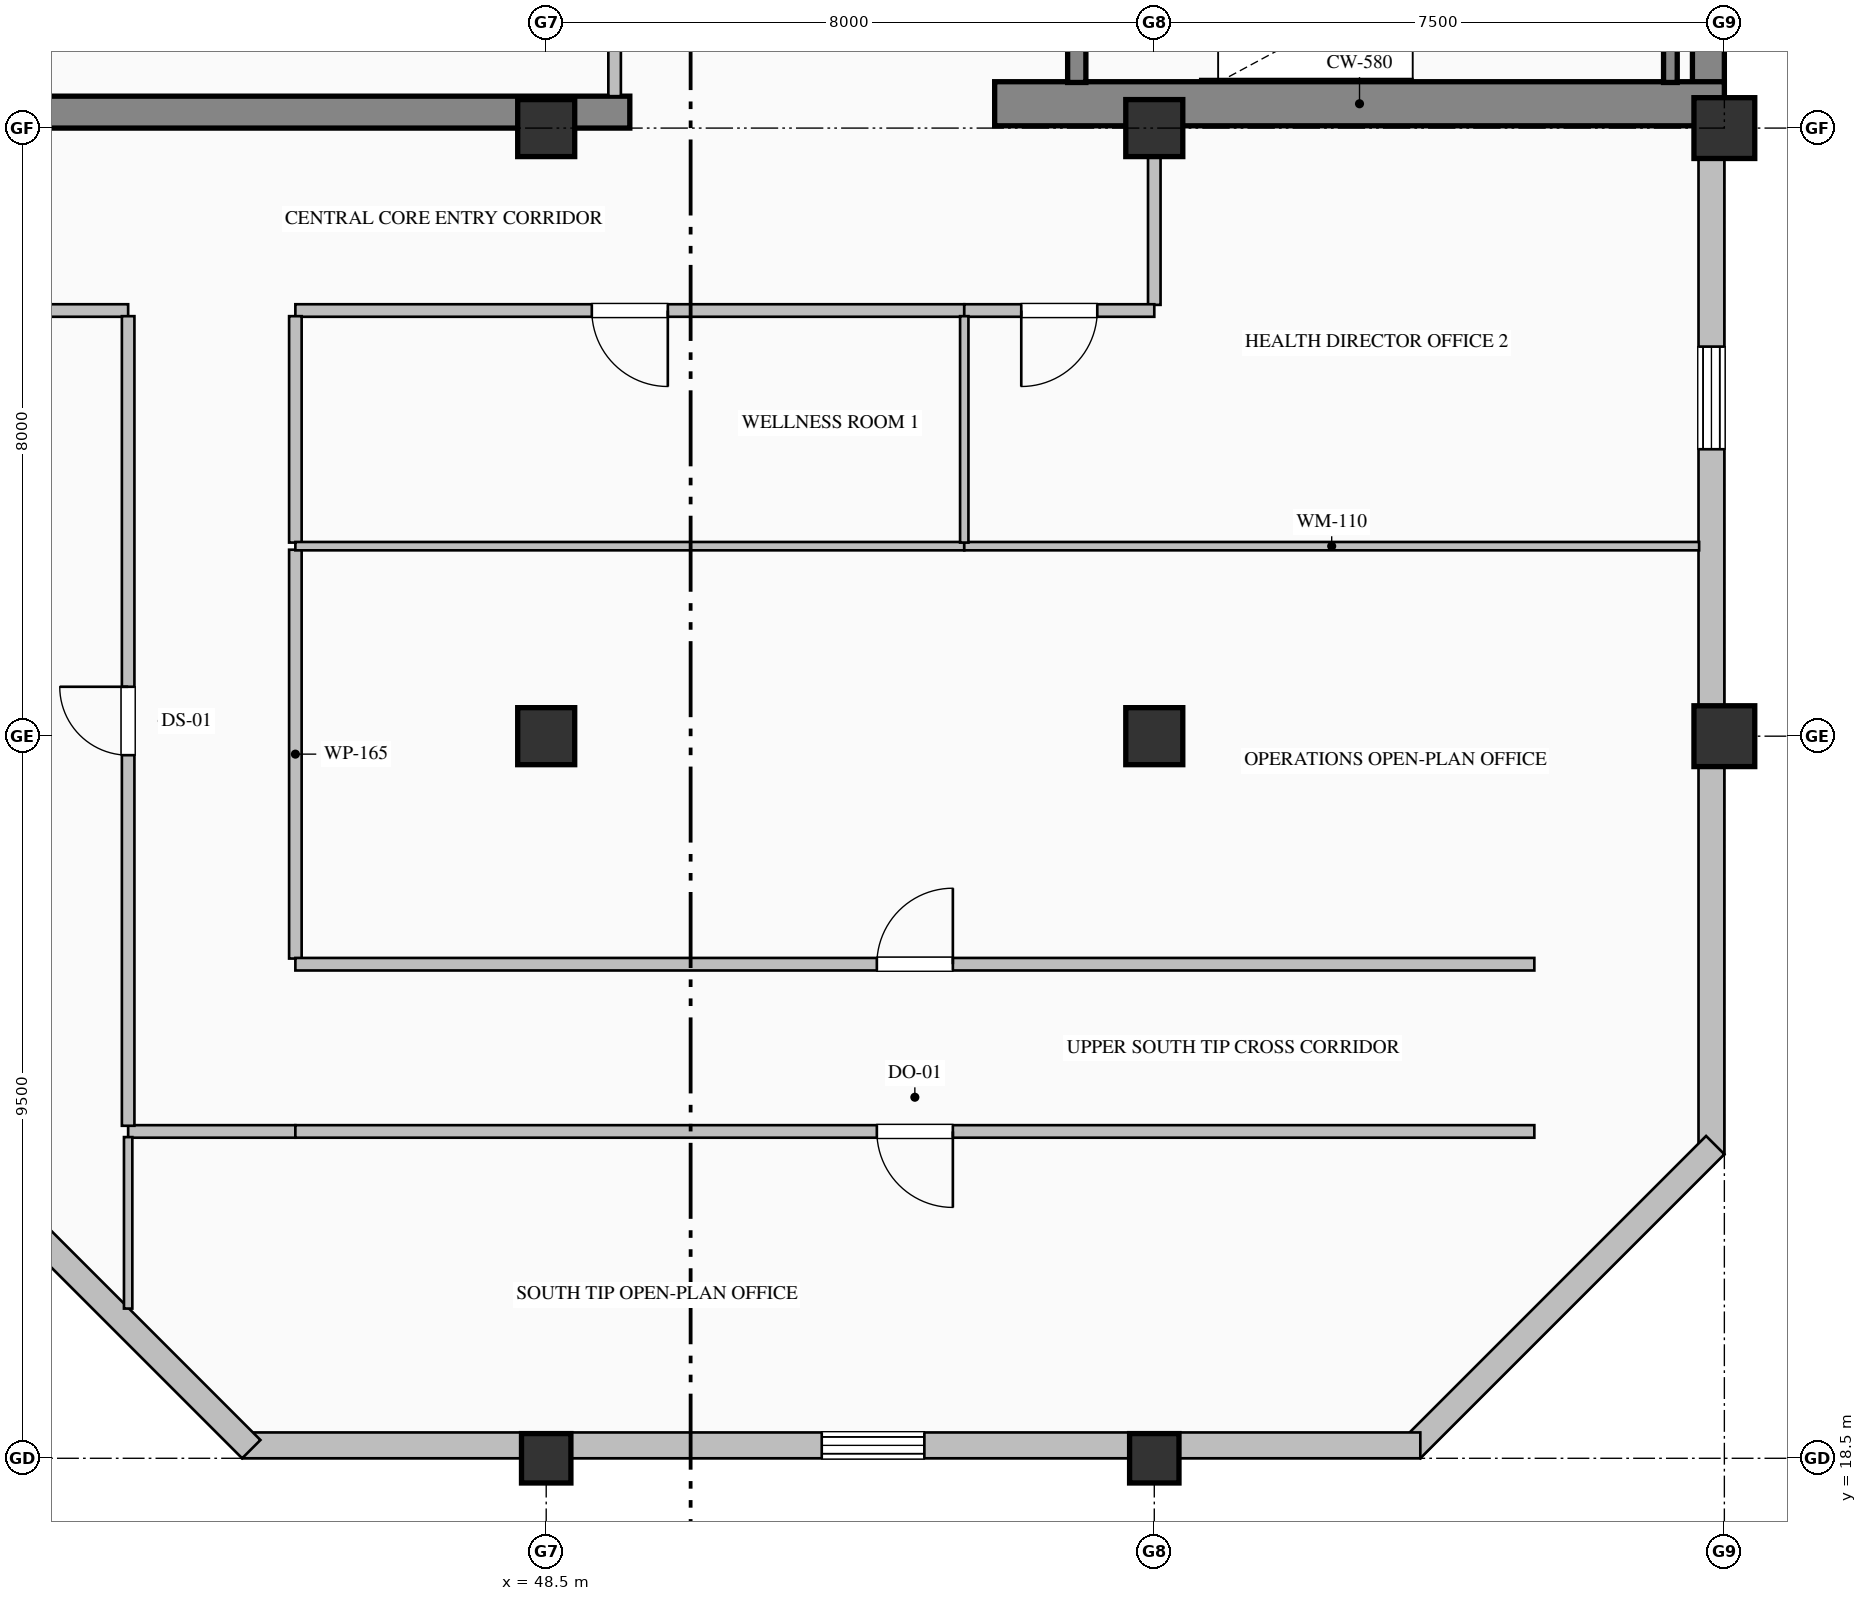
"""IFC4 building model, lengths in metres.
Left out: names, types, materials, properties, quantities, classifications, styles, units other than length and angle.
Written with IfcOpenShell. Run it as: python <this file> out.ifc"""

import sys

from ifc_helpers import new_model, si_unit, direction, frame, frame_2d, origin, origin_2d, place, context, subcontext, project, spatial, rectangle, hollow_rectangle, extrude, element, fill, save


model = new_model("IFC4")
c1 = context("Model", 3, precision=1e-05, world=origin(), true_north=direction((0.0, 1.0)))
c2 = subcontext(c1, "Body", "Model", "MODEL_VIEW")
j1 = project(units=[si_unit("LENGTHUNIT", "METRE"), si_unit("PLANEANGLEUNIT", "RADIAN")], contexts=[c1])
p1 = place(None, origin())
s1 = spatial("IfcSite", under=j1, at=p1, CompositionType="ELEMENT")
p2 = place(p1, origin())
s2 = spatial("IfcBuilding", under=s1, at=p2, CompositionType="ELEMENT")
p3 = place(p2, frame((0.0, 0.0, 343.2)))
s3 = spatial("IfcBuildingStorey", under=s2, at=p3, CompositionType="ELEMENT", Elevation=343.2)
p4 = place(p3, frame((63.79, 36.32, 0.0), z_axis=(0.0, 0.0, 1.0), x_axis=(0.0, 1.0, 0.0)))
e1 = element("IfcWall", 1, at=p4, inside=s3, PredefinedType="SHEAR", context=c2, shape_type="SweptSolid", body=[
    extrude(rectangle(XDim=15.26, YDim=0.42, at=frame_2d((7.63, 0.0))), origin(), (0.0, 0.0, 1.0), 3.785),
])
p5 = place(p3, frame((40.5, 36.21, 0.0), z_axis=(0.0, 0.0, 1.0), x_axis=(1.0, 0.0, 0.0)))
e2 = element("IfcWall", 2, at=p5, inside=s3, PredefinedType="SHEAR", context=c2, shape_type="SweptSolid", body=[
    extrude(rectangle(XDim=9.1, YDim=0.42, at=frame_2d((4.55, 0.0))), origin(), (0.0, 0.0, 1.0), 3.785),
])
p6 = place(p3, frame((54.4, 36.32, 0.0), z_axis=(0.0, 0.0, 1.0), x_axis=(1.0, 0.0, 0.0)))
e3 = element("IfcWall", 3, at=p6, inside=s3, PredefinedType="SHEAR", context=c2, shape_type="SweptSolid", body=[
    extrude(rectangle(XDim=9.6, YDim=0.58, at=frame_2d((4.8, 0.0))), origin(), (0.0, 0.0, 1.0), 4.0),
])
p7 = place(p3, frame((48.5, 18.5, 0.0), z_axis=(0.0, 0.0, 1.0), x_axis=(1.0, 0.0, 0.0)))
e4 = element("IfcColumn", 4, at=p7, inside=s3, PredefinedType="COLUMN", context=c2, shape_type="SweptSolid", body=[
    extrude(hollow_rectangle(XDim=0.65, YDim=0.65, WallThickness=0.028, at=origin_2d()), origin(), (0.0, 0.0, 1.0), 4.0),
])
for number, where, z_axis, x_axis in (
    (5, (48.5, 28.0, 0.0), (0.0, 0.0, 1.0), (1.0, 0.0, 0.0)),
    (6, (48.5, 36.0, 0.0), (0.0, 0.0, 1.0), (1.0, 0.0, 0.0)),
):
    element("IfcColumn", number, at=place(p3, frame(where, z_axis=z_axis, x_axis=x_axis)), inside=s3, PredefinedType="COLUMN", context=c2, shape_type="SweptSolid", body=[
        extrude(rectangle(XDim=0.75, YDim=0.75, at=origin_2d()), origin(), (0.0, 0.0, 1.0), 4.0),
    ])
p8 = place(p3, frame((56.5, 18.5, 0.0), z_axis=(0.0, 0.0, 1.0), x_axis=(1.0, 0.0, 0.0)))
e7 = element("IfcColumn", 7, at=p8, inside=s3, PredefinedType="COLUMN", context=c2, shape_type="SweptSolid", body=[
    extrude(hollow_rectangle(XDim=0.65, YDim=0.65, WallThickness=0.028, at=origin_2d()), origin(), (0.0, 0.0, 1.0), 4.0),
])
for number, where, z_axis, x_axis in (
    (8, (56.5, 28.0, 0.0), (0.0, 0.0, 1.0), (1.0, 0.0, 0.0)),
    (9, (56.5, 36.0, 0.0), (0.0, 0.0, 1.0), (1.0, 0.0, 0.0)),
):
    element("IfcColumn", number, at=place(p3, frame(where, z_axis=z_axis, x_axis=x_axis)), inside=s3, PredefinedType="COLUMN", context=c2, shape_type="SweptSolid", body=[
        extrude(rectangle(XDim=0.75, YDim=0.75, at=origin_2d()), origin(), (0.0, 0.0, 1.0), 4.0),
    ])
for number, where, z_axis, x_axis in (
    (10, (64.0, 28.0, 0.0), (0.0, 0.0, 1.0), (1.0, 0.0, 0.0)),
    (11, (64.0, 36.0, 0.0), (0.0, 0.0, 1.0), (1.0, 0.0, 0.0)),
):
    element("IfcColumn", number, at=place(p3, frame(where, z_axis=z_axis, x_axis=x_axis)), inside=s3, PredefinedType="COLUMN", context=c2, shape_type="SweptSolid", body=[
        extrude(hollow_rectangle(XDim=0.8, YDim=0.8, WallThickness=0.032, at=origin_2d()), origin(), (0.0, 0.0, 1.0), 4.0),
    ])
p9 = place(p3, frame((63.83, 36.05, 0.0), z_axis=(0.0, 0.0, 1.0), x_axis=(0.0, -1.0, 0.0)))
e12 = element("IfcWall", 12, at=p9, inside=s3, PredefinedType="SOLIDWALL", context=c2, shape_type="SweptSolid", body=[
    extrude(rectangle(XDim=13.55, YDim=0.34, at=frame_2d((6.775, 0.0))), origin(), (0.0, 0.0, 1.0), 3.335),
])
p10 = place(p9, frame((2.925, 0.0, 0.9)))
e13 = element("IfcOpeningElement", 13, at=p10, cuts=e12, PredefinedType="OPENING", context=c2, shape_type="SweptSolid", body=[
    extrude(rectangle(XDim=1.35, YDim=1.85, at=frame_2d((0.675, 0.925))), frame((0.0, 0.18, 0.0), z_axis=(0.0, -1.0, 0.0), x_axis=(1.0, 0.0, 0.0)), (0.0, 0.0, 1.0), 0.36),
])
p11 = place(p3, frame((63.88, 22.62, 0.0), z_axis=(0.0, 0.0, 1.0), x_axis=(-0.707106781187, -0.707106781187, 0.0)))
e14 = element("IfcWall", 14, at=p11, inside=s3, PredefinedType="SOLIDWALL", context=c2, shape_type="SweptSolid", body=[
    extrude(rectangle(XDim=5.657, YDim=0.34, at=frame_2d((2.828, 0.0))), origin(), (0.0, 0.0, 1.0), 3.785),
])
p12 = place(p3, frame((60.0, 18.67, 0.0), z_axis=(0.0, 0.0, 1.0), x_axis=(-1.0, 0.0, 0.0)))
e15 = element("IfcWall", 15, at=p12, inside=s3, PredefinedType="SOLIDWALL", context=c2, shape_type="SweptSolid", body=[
    extrude(rectangle(XDim=15.5, YDim=0.34, at=frame_2d((7.75, 0.0))), origin(), (0.0, 0.0, 1.0), 3.335),
])
p13 = place(p12, frame((6.525, 0.0, 0.9)))
e16 = element("IfcOpeningElement", 16, at=p13, cuts=e15, PredefinedType="OPENING", context=c2, shape_type="SweptSolid", body=[
    extrude(rectangle(XDim=1.35, YDim=1.85, at=frame_2d((0.675, 0.925))), frame((0.0, 0.18, 0.0), z_axis=(0.0, -1.0, 0.0), x_axis=(1.0, 0.0, 0.0)), (0.0, 0.0, 1.0), 0.36),
])
p14 = place(p3, frame((44.62, 18.62, 0.0), z_axis=(0.0, 0.0, 1.0), x_axis=(-0.707106781187, 0.707106781187, 0.0)))
e17 = element("IfcWall", 17, at=p14, inside=s3, PredefinedType="SOLIDWALL", context=c2, shape_type="SweptSolid", body=[
    extrude(rectangle(XDim=5.657, YDim=0.34, at=frame_2d((2.828, 0.0))), origin(), (0.0, 0.0, 1.0), 3.785),
])
p15 = place(p3, frame((55.48, 39.75, 0.0), z_axis=(0.0, 0.0, 1.0), x_axis=(0.0, -1.0, 0.0)))
e18 = element("IfcWall", 18, at=p15, inside=s3, PredefinedType="SOLIDWALL", context=c2, shape_type="SweptSolid", body=[
    extrude(rectangle(XDim=3.15, YDim=0.24, at=frame_2d((1.575, 0.0))), origin(), (0.0, 0.0, 1.0), 4.0),
])
p16 = place(p15, frame((1.0, 0.0, 0.0)))
e19 = element("IfcOpeningElement", 19, at=p16, cuts=e18, PredefinedType="OPENING", context=c2, shape_type="SweptSolid", body=[
    extrude(rectangle(XDim=1.15, YDim=2.2, at=frame_2d((0.575, 1.1))), frame((0.0, 0.13, 0.0), z_axis=(0.0, -1.0, 0.0), x_axis=(1.0, 0.0, 0.0)), (0.0, 0.0, 1.0), 0.26),
])
p17 = place(p3, frame((63.29, 36.6, 0.0), z_axis=(0.0, 0.0, 1.0), x_axis=(0.0, 1.0, 0.0)))
e20 = element("IfcWall", 20, at=p17, inside=s3, PredefinedType="SOLIDWALL", context=c2, shape_type="SweptSolid", body=[
    extrude(rectangle(XDim=3.15, YDim=0.18, at=frame_2d((1.575, 0.0))), origin(), (0.0, 0.0, 1.0), 4.0),
])
p18 = place(p3, frame((49.4, 36.42, 0.0), z_axis=(0.0, 0.0, 1.0), x_axis=(0.0, 1.0, 0.0)))
e21 = element("IfcWall", 21, at=p18, inside=s3, PredefinedType="PARTITIONING", context=c2, shape_type="SweptSolid", body=[
    extrude(rectangle(XDim=3.133, YDim=0.165, at=frame_2d((1.566, 0.0))), origin(), (0.0, 0.0, 1.0), 3.027),
])
p19 = place(p18, frame((1.066, 0.0, 0.0)))
e22 = element("IfcOpeningElement", 22, at=p19, cuts=e21, PredefinedType="OPENING", context=c2, shape_type="SweptSolid", body=[
    extrude(rectangle(XDim=1.0, YDim=2.15, at=frame_2d((0.5, 1.075))), frame((0.0, 0.093, 0.0), z_axis=(0.0, -1.0, 0.0), x_axis=(1.0, 0.0, 0.0)), (0.0, 0.0, 1.0), 0.185),
])
p20 = place(p3, frame((54.0, 33.6, 0.0), z_axis=(0.0, 0.0, 1.0), x_axis=(-1.0, 0.0, 0.0)))
e23 = element("IfcWall", 23, at=p20, inside=s3, PredefinedType="PARTITIONING", context=c2, shape_type="SweptSolid", body=[
    extrude(rectangle(XDim=8.8, YDim=0.165, at=frame_2d((4.4, 0.0))), origin(), (0.0, 0.0, 1.0), 3.785),
])
p21 = place(p20, frame((3.9, 0.0, 0.0)))
e24 = element("IfcOpeningElement", 24, at=p21, cuts=e23, PredefinedType="OPENING", context=c2, shape_type="SweptSolid", body=[
    extrude(rectangle(XDim=1.0, YDim=2.15, at=frame_2d((0.5, 1.075))), frame((0.0, 0.093, 0.0), z_axis=(0.0, -1.0, 0.0), x_axis=(1.0, 0.0, 0.0)), (0.0, 0.0, 1.0), 0.185),
])
p22 = place(p3, frame((56.5, 36.0, 0.0), z_axis=(0.0, 0.0, 1.0), x_axis=(0.0, -1.0, 0.0)))
e25 = element("IfcWall", 25, at=p22, inside=s3, PredefinedType="PARTITIONING", context=c2, shape_type="SweptSolid", body=[
    extrude(rectangle(XDim=2.325, YDim=0.165, at=frame_2d((1.163, 0.0))), origin(), (0.0, 0.0, 1.0), 3.177),
])
p23 = place(p3, frame((56.5, 33.6, 0.0), z_axis=(0.0, 0.0, 1.0), x_axis=(-1.0, 0.0, 0.0)))
e26 = element("IfcWall", 26, at=p23, inside=s3, PredefinedType="PARTITIONING", context=c2, shape_type="SweptSolid", body=[
    extrude(rectangle(XDim=2.5, YDim=0.165, at=frame_2d((1.25, 0.0))), origin(), (0.0, 0.0, 1.0), 3.785),
])
p24 = place(p23, frame((0.75, 0.0, 0.0)))
e27 = element("IfcOpeningElement", 27, at=p24, cuts=e26, PredefinedType="OPENING", context=c2, shape_type="SweptSolid", body=[
    extrude(rectangle(XDim=1.0, YDim=2.15, at=frame_2d((0.5, 1.075))), frame((0.0, 0.093, 0.0), z_axis=(0.0, -1.0, 0.0), x_axis=(1.0, 0.0, 0.0)), (0.0, 0.0, 1.0), 0.185),
])
p25 = place(p3, frame((43.0, 33.6, 0.0), z_axis=(0.0, 0.0, 1.0), x_axis=(-1.0, 0.0, 0.0)))
e28 = element("IfcWall", 28, at=p25, inside=s3, PredefinedType="PARTITIONING", context=c2, shape_type="SweptSolid", body=[
    extrude(rectangle(XDim=2.5, YDim=0.165, at=frame_2d((1.25, 0.0))), origin(), (0.0, 0.0, 1.0), 3.785),
])
p26 = place(p3, frame((45.2, 22.8, 0.0), z_axis=(0.0, 0.0, 1.0), x_axis=(-1.0, 0.0, 0.0)))
e29 = element("IfcWall", 29, at=p26, inside=s3, PredefinedType="PARTITIONING", context=c2, shape_type="SweptSolid", body=[
    extrude(rectangle(XDim=2.2, YDim=0.165, at=frame_2d((1.1, 0.0))), origin(), (0.0, 0.0, 1.0), 3.785),
])
p27 = place(p3, frame((45.2, 30.453, 0.0), z_axis=(0.0, 0.0, 1.0), x_axis=(0.0, -1.0, 0.0)))
e30 = element("IfcWall", 30, at=p27, inside=s3, PredefinedType="PARTITIONING", context=c2, shape_type="SweptSolid", body=[
    extrude(rectangle(XDim=5.378, YDim=0.165, at=frame_2d((2.689, 0.0))), origin(), (0.0, 0.0, 1.0), 3.785),
])
p28 = place(p3, frame((45.2, 33.525, 0.0), z_axis=(0.0, 0.0, 1.0), x_axis=(0.0, -1.0, 0.0)))
e31 = element("IfcWall", 31, at=p28, inside=s3, PredefinedType="PARTITIONING", context=c2, shape_type="SweptSolid", body=[
    extrude(rectangle(XDim=2.978, YDim=0.165, at=frame_2d((1.489, 0.0))), origin(), (0.0, 0.0, 1.0), 3.785),
])
p29 = place(p3, frame((43.0, 22.875, 0.0), z_axis=(0.0, 0.0, 1.0), x_axis=(0.0, 1.0, 0.0)))
e32 = element("IfcWall", 32, at=p29, inside=s3, PredefinedType="PARTITIONING", context=c2, shape_type="SweptSolid", body=[
    extrude(rectangle(XDim=10.651, YDim=0.165, at=frame_2d((5.325, 0.0))), origin(), (0.0, 0.0, 1.0), 3.785),
])
p30 = place(p29, frame((4.875, 0.0, 0.0)))
e33 = element("IfcOpeningElement", 33, at=p30, cuts=e32, PredefinedType="OPENING", context=c2, shape_type="SweptSolid", body=[
    extrude(rectangle(XDim=0.9, YDim=2.15, at=frame_2d((0.45, 1.075))), frame((0.0, 0.093, 0.0), z_axis=(0.0, -1.0, 0.0), x_axis=(1.0, 0.0, 0.0)), (0.0, 0.0, 1.0), 0.185),
])
p31 = place(p3, frame((61.5, 22.8, 0.0), z_axis=(0.0, 0.0, 1.0), x_axis=(-1.0, 0.0, 0.0)))
e34 = element("IfcWall", 34, at=p31, inside=s3, PredefinedType="PARTITIONING", context=c2, shape_type="SweptSolid", body=[
    extrude(rectangle(XDim=16.3, YDim=0.165, at=frame_2d((8.15, 0.0))), origin(), (0.0, 0.0, 1.0), 3.785),
])
p32 = place(p31, frame((7.65, 0.0, 0.0)))
e35 = element("IfcOpeningElement", 35, at=p32, cuts=e34, PredefinedType="OPENING", context=c2, shape_type="SweptSolid", body=[
    extrude(rectangle(XDim=1.0, YDim=2.15, at=frame_2d((0.5, 1.075))), frame((0.0, 0.093, 0.0), z_axis=(0.0, -1.0, 0.0), x_axis=(1.0, 0.0, 0.0)), (0.0, 0.0, 1.0), 0.185),
])
p33 = place(p3, frame((45.2, 25.0, 0.0), z_axis=(0.0, 0.0, 1.0), x_axis=(1.0, 0.0, 0.0)))
e36 = element("IfcWall", 36, at=p33, inside=s3, PredefinedType="PARTITIONING", context=c2, shape_type="SweptSolid", body=[
    extrude(rectangle(XDim=16.3, YDim=0.165, at=frame_2d((8.15, 0.0))), origin(), (0.0, 0.0, 1.0), 3.785),
])
p34 = place(p33, frame((7.65, 0.0, 0.0)))
e37 = element("IfcOpeningElement", 37, at=p34, cuts=e36, PredefinedType="OPENING", context=c2, shape_type="SweptSolid", body=[
    extrude(rectangle(XDim=1.0, YDim=2.15, at=frame_2d((0.5, 1.075))), frame((0.0, 0.093, 0.0), z_axis=(0.0, -1.0, 0.0), x_axis=(1.0, 0.0, 0.0)), (0.0, 0.0, 1.0), 0.185),
])
p35 = place(p3, frame((43.0, 20.469, 0.0), z_axis=(0.0, 0.0, 1.0), x_axis=(0.0, 1.0, 0.0)))
e38 = element("IfcWall", 38, at=p35, inside=s3, PredefinedType="MOVABLE", context=c2, shape_type="SweptSolid", body=[
    extrude(rectangle(XDim=2.256, YDim=0.11, at=frame_2d((1.128, 0.0))), origin(), (0.0, 0.0, 1.0), 3.785),
])
p36 = place(p3, frame((45.2, 30.5, 0.0), z_axis=(0.0, 0.0, 1.0), x_axis=(1.0, 0.0, 0.0)))
e39 = element("IfcWall", 39, at=p36, inside=s3, PredefinedType="MOVABLE", context=c2, shape_type="SweptSolid", body=[
    extrude(rectangle(XDim=8.8, YDim=0.11, at=frame_2d((4.4, 0.0))), origin(), (0.0, 0.0, 1.0), 3.785),
])
p37 = place(p3, frame((54.0, 30.5, 0.0), z_axis=(0.0, 0.0, 1.0), x_axis=(1.0, 0.0, 0.0)))
e40 = element("IfcWall", 40, at=p37, inside=s3, PredefinedType="MOVABLE", context=c2, shape_type="SweptSolid", body=[
    extrude(rectangle(XDim=9.668, YDim=0.11, at=frame_2d((4.834, 0.0))), origin(), (0.0, 0.0, 1.0), 3.785),
])
p38 = place(p3, frame((54.0, 33.525, 0.0), z_axis=(0.0, 0.0, 1.0), x_axis=(0.0, -1.0, 0.0)))
e41 = element("IfcWall", 41, at=p38, inside=s3, PredefinedType="MOVABLE", context=c2, shape_type="SweptSolid", body=[
    extrude(rectangle(XDim=2.978, YDim=0.11, at=frame_2d((1.489, 0.0))), origin(), (0.0, 0.0, 1.0), 3.785),
])
p39 = place(p10, origin())
e42 = element("IfcWindow", 42, at=p39, inside=s3, PartitioningType="DOUBLE_PANEL_VERTICAL", PredefinedType="WINDOW", context=c2, shape_type="SweptSolid", body=[
    extrude(rectangle(XDim=1.35, YDim=1.85, at=frame_2d((0.675, 0.925))), frame((0.0, 0.15, 0.0), z_axis=(0.0, -1.0, 0.0), x_axis=(1.0, 0.0, 0.0)), (0.0, 0.0, 1.0), 0.06),
])
fill(e13, e42)
p40 = place(p13, origin())
e43 = element("IfcWindow", 43, at=p40, inside=s3, PartitioningType="DOUBLE_PANEL_VERTICAL", PredefinedType="WINDOW", context=c2, shape_type="SweptSolid", body=[
    extrude(rectangle(XDim=1.35, YDim=1.85, at=frame_2d((0.675, 0.925))), frame((0.0, 0.15, 0.0), z_axis=(0.0, -1.0, 0.0), x_axis=(1.0, 0.0, 0.0)), (0.0, 0.0, 1.0), 0.06),
])
fill(e16, e43)
p41 = place(p32, origin())
e44 = element("IfcDoor", 44, at=p41, inside=s3, OperationType="SINGLE_SWING_LEFT", PredefinedType="DOOR", context=c2, shape_type="SweptSolid", body=[
    extrude(rectangle(XDim=1.0, YDim=2.15, at=frame_2d((0.5, 1.075))), frame((0.0, 0.025, 0.0), z_axis=(0.0, -1.0, 0.0), x_axis=(1.0, 0.0, 0.0)), (0.0, 0.0, 1.0), 0.05),
])
fill(e35, e44)
p42 = place(p34, origin())
e45 = element("IfcDoor", 45, at=p42, inside=s3, OperationType="SINGLE_SWING_RIGHT", PredefinedType="DOOR", context=c2, shape_type="SweptSolid", body=[
    extrude(rectangle(XDim=1.0, YDim=2.15, at=frame_2d((0.5, 1.075))), frame((0.0, 0.025, 0.0), z_axis=(0.0, -1.0, 0.0), x_axis=(1.0, 0.0, 0.0)), (0.0, 0.0, 1.0), 0.05),
])
fill(e37, e45)
p43 = place(p21, origin())
e46 = element("IfcDoor", 46, at=p43, inside=s3, OperationType="SINGLE_SWING_LEFT", PredefinedType="DOOR", context=c2, shape_type="SweptSolid", body=[
    extrude(rectangle(XDim=1.0, YDim=2.15, at=frame_2d((0.5, 1.075))), frame((0.0, 0.025, 0.0), z_axis=(0.0, -1.0, 0.0), x_axis=(1.0, 0.0, 0.0)), (0.0, 0.0, 1.0), 0.05),
])
fill(e24, e46)
p44 = place(p24, origin())
e47 = element("IfcDoor", 47, at=p44, inside=s3, OperationType="SINGLE_SWING_RIGHT", PredefinedType="DOOR", context=c2, shape_type="SweptSolid", body=[
    extrude(rectangle(XDim=1.0, YDim=2.15, at=frame_2d((0.5, 1.075))), frame((0.0, 0.025, 0.0), z_axis=(0.0, -1.0, 0.0), x_axis=(1.0, 0.0, 0.0)), (0.0, 0.0, 1.0), 0.05),
])
fill(e27, e47)
p45 = place(p30, origin())
e48 = element("IfcDoor", 48, at=p45, inside=s3, OperationType="SINGLE_SWING_RIGHT", PredefinedType="DOOR", context=c2, shape_type="SweptSolid", body=[
    extrude(rectangle(XDim=0.9, YDim=2.15, at=frame_2d((0.45, 1.075))), frame((0.0, 0.025, 0.0), z_axis=(0.0, -1.0, 0.0), x_axis=(1.0, 0.0, 0.0)), (0.0, 0.0, 1.0), 0.05),
])
fill(e33, e48)
save(model, sys.argv[1])
